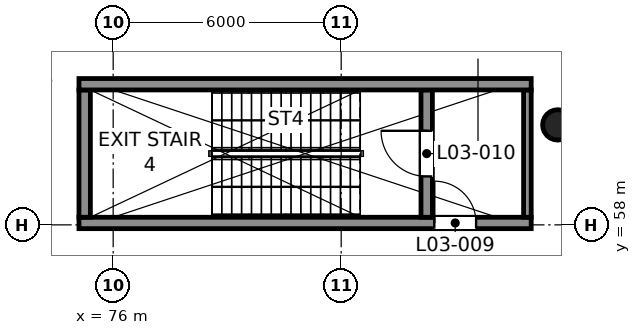
"""IFC4 building model, lengths in metres.
Left out: names, types, materials, properties, quantities, classifications, styles, units other than length and angle.
Written with IfcOpenShell. Run it as: python <this file> out.ifc"""

import sys

from ifc_helpers import new_model, si_unit, direction, frame, frame_2d, origin, origin_2d, place, context, subcontext, project, spatial, rectangle, circle, extrude, element, fill, save


model = new_model("IFC4")
c1 = context("Model", 3, precision=1e-05, world=origin(), true_north=direction((0.0, 1.0)))
c2 = subcontext(c1, "Body", "Model", "MODEL_VIEW")
j1 = project(units=[si_unit("LENGTHUNIT", "METRE"), si_unit("PLANEANGLEUNIT", "RADIAN")], contexts=[c1])
p1 = place(None, origin())
s1 = spatial("IfcSite", under=j1, at=p1, CompositionType="ELEMENT")
p2 = place(p1, origin())
s2 = spatial("IfcBuilding", under=s1, at=p2, CompositionType="ELEMENT")
p3 = place(p2, frame((0.0, 0.0, 23.0)))
s3 = spatial("IfcBuildingStorey", under=s2, at=p3, CompositionType="ELEMENT", Elevation=23.0)
p4 = place(p3, frame((87.7, 60.63, 0.0), z_axis=(0.0, 0.0, 1.0), x_axis=(1.0, 0.0, 0.0)))
e1 = element("IfcColumn", 1, at=p4, inside=s3, PredefinedType="COLUMN", context=c2, shape_type="SweptSolid", body=[
    extrude(circle(Radius=0.4, at=origin_2d()), origin(), (0.0, 0.0, 1.0), 6.0),
])
p5 = place(p3, frame((75.1, 58.05, 0.0), z_axis=(0.0, 0.0, 1.0), x_axis=(1.0, 0.0, 0.0)))
e2 = element("IfcWall", 2, at=p5, inside=s3, PredefinedType="SHEAR", context=c2, shape_type="SweptSolid", body=[
    extrude(rectangle(XDim=11.9, YDim=0.3, at=frame_2d((5.95, 0.0))), origin(), (0.0, 0.0, 1.0), 6.0),
])
p6 = place(p5, frame((9.35, 0.0, 0.0)))
e3 = element("IfcOpeningElement", 3, at=p6, cuts=e2, PredefinedType="OPENING", context=c2, shape_type="SweptSolid", body=[
    extrude(rectangle(XDim=1.1, YDim=2.1, at=frame_2d((0.55, 1.05))), frame((0.0, 0.16, 0.0), z_axis=(0.0, -1.0, 0.0), x_axis=(1.0, 0.0, 0.0)), (0.0, 0.0, 1.0), 0.32),
])
p7 = place(p3, frame((75.25, 58.2, 0.0), z_axis=(0.0, 0.0, 1.0), x_axis=(0.0, 1.0, 0.0)))
e4 = element("IfcWall", 4, at=p7, inside=s3, PredefinedType="SHEAR", context=c2, shape_type="SweptSolid", body=[
    extrude(rectangle(XDim=3.35, YDim=0.3, at=frame_2d((1.675, 0.0))), origin(), (0.0, 0.0, 1.0), 6.0),
])
p8 = place(p3, frame((84.25, 58.2, 0.0), z_axis=(0.0, 0.0, 1.0), x_axis=(0.0, 1.0, 0.0)))
e5 = element("IfcWall", 5, at=p8, inside=s3, PredefinedType="SHEAR", context=c2, shape_type="SweptSolid", body=[
    extrude(rectangle(XDim=3.35, YDim=0.3, at=frame_2d((1.675, 0.0))), origin(), (0.0, 0.0, 1.0), 6.0),
])
p9 = place(p8, frame((1.075, 0.0, 0.0)))
e6 = element("IfcOpeningElement", 6, at=p9, cuts=e5, PredefinedType="OPENING", context=c2, shape_type="SweptSolid", body=[
    extrude(rectangle(XDim=1.2, YDim=2.1, at=frame_2d((0.6, 1.05))), frame((0.0, 0.16, 0.0), z_axis=(0.0, -1.0, 0.0), x_axis=(1.0, 0.0, 0.0)), (0.0, 0.0, 1.0), 0.32),
])
p10 = place(p3, frame((86.9, 58.2, 0.0), z_axis=(0.0, 0.0, 1.0), x_axis=(0.0, 1.0, 0.0)))
e7 = element("IfcWall", 7, at=p10, inside=s3, PredefinedType="SHEAR", context=c2, shape_type="SweptSolid", body=[
    extrude(rectangle(XDim=3.35, YDim=0.2, at=frame_2d((1.675, 0.0))), origin(), (0.0, 0.0, 1.0), 6.0),
])
p11 = place(p3, frame((75.1, 61.7, 0.0), z_axis=(0.0, 0.0, 1.0), x_axis=(1.0, 0.0, 0.0)))
e8 = element("IfcWall", 8, at=p11, inside=s3, PredefinedType="SHEAR", context=c2, shape_type="SweptSolid", body=[
    extrude(rectangle(XDim=11.9, YDim=0.3, at=frame_2d((5.95, 0.0))), origin(), (0.0, 0.0, 1.0), 6.0),
])
p12 = place(p6, origin())
e9 = element("IfcDoor", 9, at=p12, inside=s3, OperationType="SINGLE_SWING_LEFT", PredefinedType="DOOR", context=c2, shape_type="SweptSolid", body=[
    extrude(rectangle(XDim=1.1, YDim=2.1, at=frame_2d((0.55, 1.05))), frame((0.0, 0.025, 0.0), z_axis=(0.0, -1.0, 0.0), x_axis=(1.0, 0.0, 0.0)), (0.0, 0.0, 1.0), 0.05),
])
fill(e3, e9)
p13 = place(p9, origin())
e10 = element("IfcDoor", 10, at=p13, inside=s3, OperationType="SINGLE_SWING_RIGHT", PredefinedType="DOOR", context=c2, shape_type="SweptSolid", body=[
    extrude(rectangle(XDim=1.2, YDim=2.1, at=frame_2d((0.6, 1.05))), frame((0.0, 0.025, 0.0), z_axis=(0.0, -1.0, 0.0), x_axis=(1.0, 0.0, 0.0)), (0.0, 0.0, 1.0), 0.05),
])
fill(e6, e10)
save(model, sys.argv[1])
